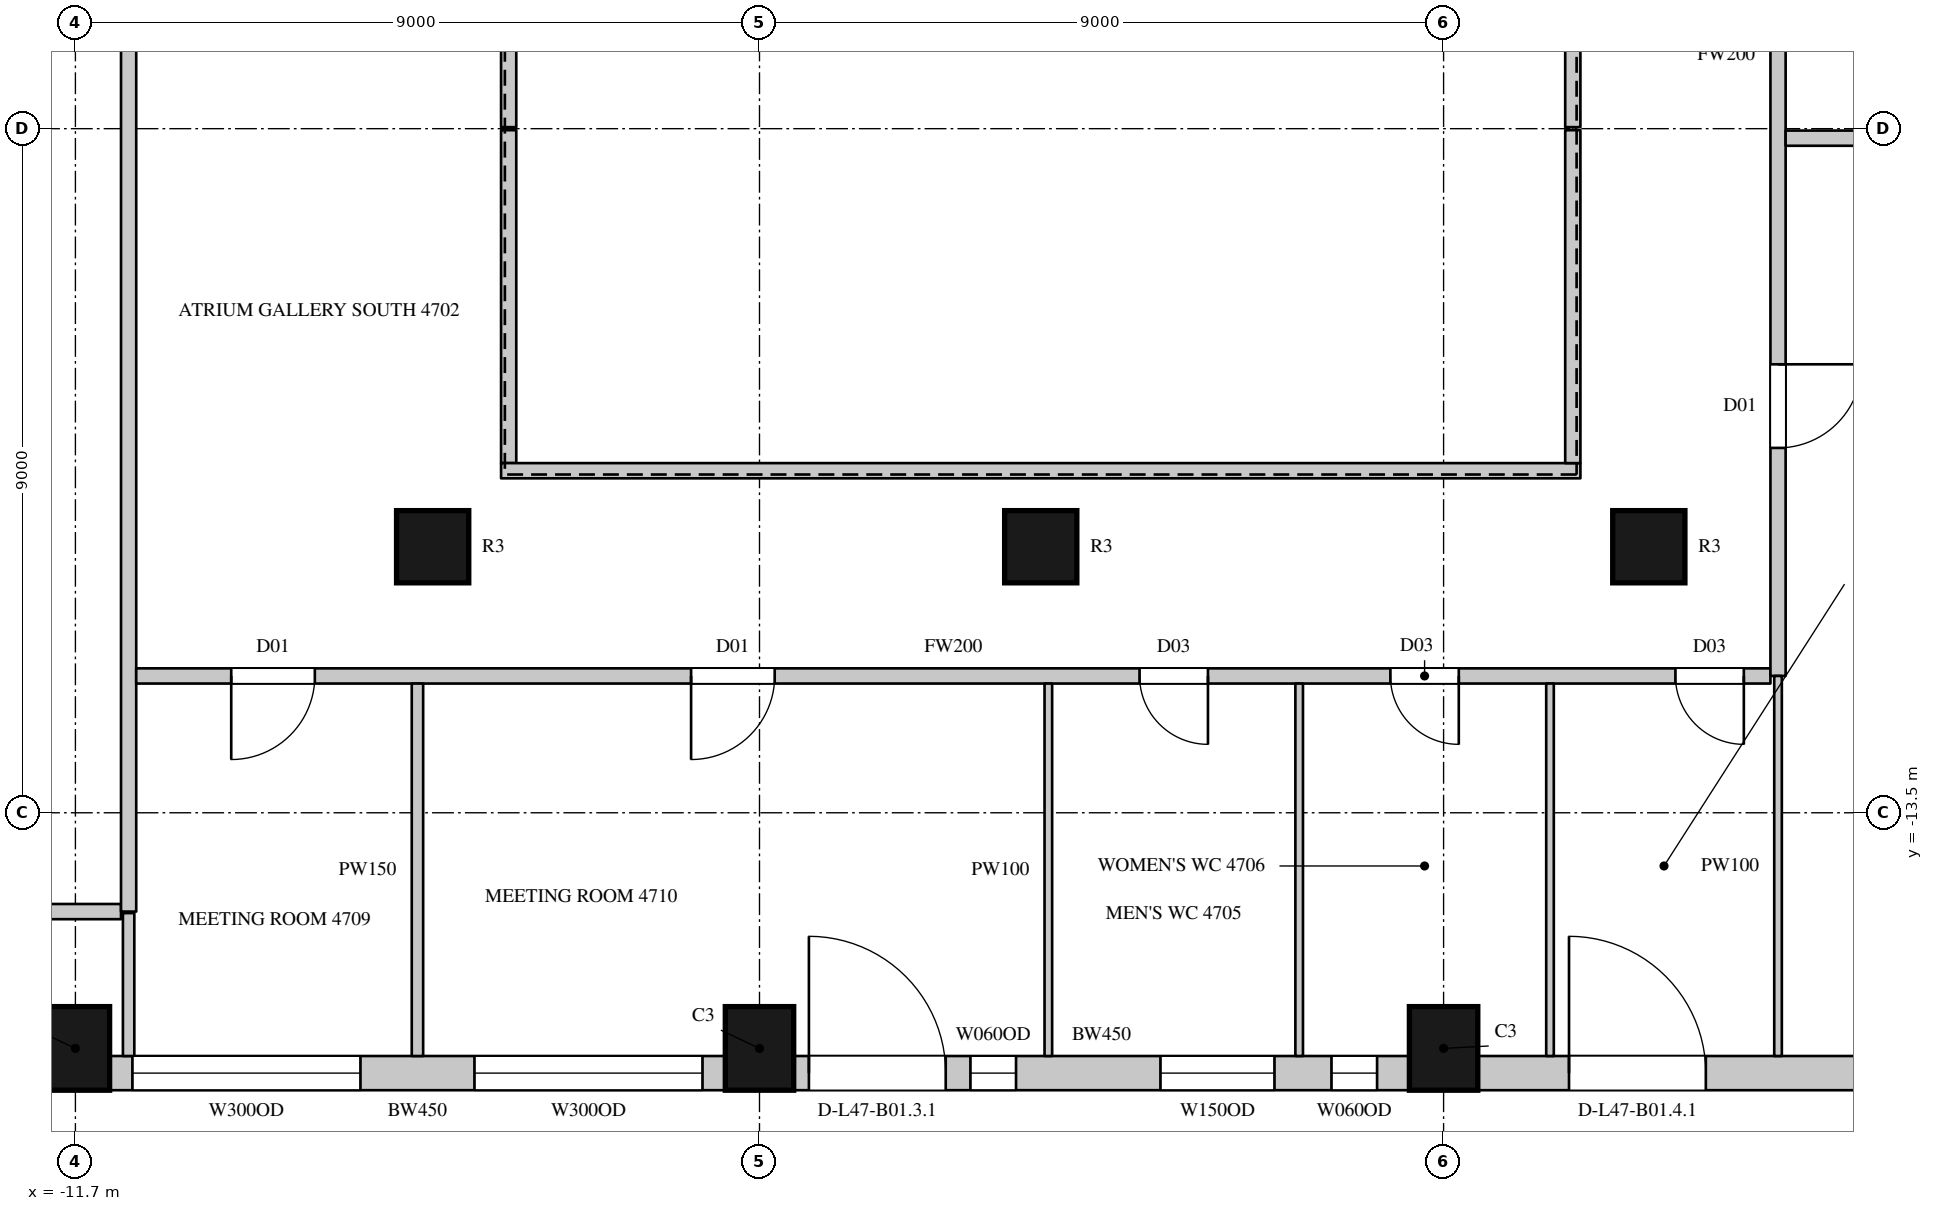
"""IFC4 building model, lengths in metres.
Left out: names, types, materials, properties, quantities, classifications, styles, units other than length and angle.
Written with IfcOpenShell. Run it as: python <this file> out.ifc"""

import sys

from ifc_helpers import new_model, si_unit, direction, frame, frame_2d, origin, origin_2d, place, context, subcontext, project, spatial, rectangle, circle, extrude, element, fill, save


model = new_model("IFC4")
c1 = context("Model", 3, precision=1e-05, world=origin(), true_north=direction((0.0, 1.0)))
c2 = subcontext(c1, "Body", "Model", "MODEL_VIEW")
j1 = project(units=[si_unit("LENGTHUNIT", "METRE"), si_unit("PLANEANGLEUNIT", "RADIAN")], contexts=[c1])
p1 = place(None, origin())
s1 = spatial("IfcSite", under=j1, at=p1, CompositionType="ELEMENT")
p2 = place(p1, origin())
s2 = spatial("IfcBuilding", under=s1, at=p2, CompositionType="ELEMENT")
p3 = place(p2, frame((0.0, 0.0, 213.8)))
s3 = spatial("IfcBuildingStorey", under=s2, at=p3, CompositionType="ELEMENT", Elevation=213.8)
for number, where, z_axis, x_axis in (
    (1, (-11.7, -16.6, 0.0), (0.0, 0.0, 1.0), (1.0, 0.0, 0.0)),
    (2, (-2.7, -16.6, 0.0), (0.0, 0.0, 1.0), (1.0, 0.0, 0.0)),
    (3, (6.3, -16.6, 0.0), (0.0, 0.0, 1.0), (1.0, 0.0, 0.0)),
):
    element("IfcColumn", number, at=place(p3, frame(where, z_axis=z_axis, x_axis=x_axis)), inside=s3, PredefinedType="COLUMN", context=c2, shape_type="SweptSolid", body=[
        extrude(rectangle(XDim=0.9, YDim=1.1, at=origin_2d()), origin(), (0.0, 0.0, 1.0), 4.1),
    ])
for number, where, z_axis, x_axis in (
    (4, (-7.0, -10.0, 0.0), (0.0, 0.0, 1.0), (1.0, 0.0, 0.0)),
    (5, (1.0, -10.0, 0.0), (0.0, 0.0, 1.0), (1.0, 0.0, 0.0)),
    (6, (9.0, -10.0, 0.0), (0.0, 0.0, 1.0), (1.0, 0.0, 0.0)),
):
    element("IfcColumn", number, at=place(p3, frame(where, z_axis=z_axis, x_axis=x_axis)), inside=s3, PredefinedType="COLUMN", context=c2, shape_type="SweptSolid", body=[
        extrude(circle(Radius=0.475, at=origin_2d()), origin(), (0.0, 0.0, 1.0), 4.1),
    ])
p4 = place(p3, frame((-11.25, -16.925, 0.0), z_axis=(0.0, 0.0, 1.0), x_axis=(1.0, 0.0, 0.0)))
e7 = element("IfcWall", 7, at=p4, inside=s3, PredefinedType="SOLIDWALL", context=c2, shape_type="SweptSolid", body=[
    extrude(rectangle(XDim=8.1, YDim=0.45, at=frame_2d((4.05, 0.0))), origin(), (0.0, 0.0, 1.0), 3.8),
])
p5 = place(p4, frame((0.3, 0.0, 1.05)))
e8 = element("IfcOpeningElement", 8, at=p5, cuts=e7, PredefinedType="OPENING", context=c2, shape_type="SweptSolid", body=[
    extrude(rectangle(XDim=3.0, YDim=2.4, at=frame_2d((1.5, 1.2))), frame((0.0, 0.235, 0.0), z_axis=(0.0, -1.0, 0.0), x_axis=(1.0, 0.0, 0.0)), (0.0, 0.0, 1.0), 0.47),
])
p6 = place(p4, frame((4.8, 0.0, 1.05)))
e9 = element("IfcOpeningElement", 9, at=p6, cuts=e7, PredefinedType="OPENING", context=c2, shape_type="SweptSolid", body=[
    extrude(rectangle(XDim=3.0, YDim=2.4, at=frame_2d((1.5, 1.2))), frame((0.0, 0.235, 0.0), z_axis=(0.0, -1.0, 0.0), x_axis=(1.0, 0.0, 0.0)), (0.0, 0.0, 1.0), 0.47),
])
p7 = place(p3, frame((-2.25, -16.925, 0.0), z_axis=(0.0, 0.0, 1.0), x_axis=(1.0, 0.0, 0.0)))
e10 = element("IfcWall", 10, at=p7, inside=s3, PredefinedType="SOLIDWALL", context=c2, shape_type="SweptSolid", body=[
    extrude(rectangle(XDim=8.1, YDim=0.45, at=frame_2d((4.05, 0.0))), origin(), (0.0, 0.0, 1.0), 3.8),
])
p8 = place(p7, frame((0.2, 0.0, 0.0)))
e11 = element("IfcOpeningElement", 11, at=p8, cuts=e10, PredefinedType="OPENING", context=c2, shape_type="SweptSolid", body=[
    extrude(rectangle(XDim=1.8, YDim=2.4, at=frame_2d((0.9, 1.2))), frame((0.0, 0.235, 0.0), z_axis=(0.0, -1.0, 0.0), x_axis=(1.0, 0.0, 0.0)), (0.0, 0.0, 1.0), 0.47),
])
p9 = place(p7, frame((2.325, 0.0, 1.05)))
e12 = element("IfcOpeningElement", 12, at=p9, cuts=e10, PredefinedType="OPENING", context=c2, shape_type="SweptSolid", body=[
    extrude(rectangle(XDim=0.6, YDim=2.4, at=frame_2d((0.3, 1.2))), frame((0.0, 0.235, 0.0), z_axis=(0.0, -1.0, 0.0), x_axis=(1.0, 0.0, 0.0)), (0.0, 0.0, 1.0), 0.47),
])
p10 = place(p7, frame((4.825, 0.0, 1.05)))
e13 = element("IfcOpeningElement", 13, at=p10, cuts=e10, PredefinedType="OPENING", context=c2, shape_type="SweptSolid", body=[
    extrude(rectangle(XDim=1.5, YDim=2.4, at=frame_2d((0.75, 1.2))), frame((0.0, 0.235, 0.0), z_axis=(0.0, -1.0, 0.0), x_axis=(1.0, 0.0, 0.0)), (0.0, 0.0, 1.0), 0.47),
])
p11 = place(p7, frame((7.075, 0.0, 1.05)))
e14 = element("IfcOpeningElement", 14, at=p11, cuts=e10, PredefinedType="OPENING", context=c2, shape_type="SweptSolid", body=[
    extrude(rectangle(XDim=0.6, YDim=2.4, at=frame_2d((0.3, 1.2))), frame((0.0, 0.235, 0.0), z_axis=(0.0, -1.0, 0.0), x_axis=(1.0, 0.0, 0.0)), (0.0, 0.0, 1.0), 0.47),
])
p12 = place(p3, frame((6.75, -16.925, 0.0), z_axis=(0.0, 0.0, 1.0), x_axis=(1.0, 0.0, 0.0)))
e15 = element("IfcWall", 15, at=p12, inside=s3, PredefinedType="SOLIDWALL", context=c2, shape_type="SweptSolid", body=[
    extrude(rectangle(XDim=6.414, YDim=0.45, at=frame_2d((3.207, 0.0))), origin(), (0.0, 0.0, 1.0), 3.8),
])
p13 = place(p12, frame((1.2, 0.0, 0.0)))
e16 = element("IfcOpeningElement", 16, at=p13, cuts=e15, PredefinedType="OPENING", context=c2, shape_type="SweptSolid", body=[
    extrude(rectangle(XDim=1.8, YDim=2.4, at=frame_2d((0.9, 1.2))), frame((0.0, 0.235, 0.0), z_axis=(0.0, -1.0, 0.0), x_axis=(1.0, 0.0, 0.0)), (0.0, 0.0, 1.0), 0.47),
])
p14 = place(p3, frame((-13.97, -14.8, 0.0), z_axis=(0.0, 0.0, 1.0), x_axis=(1.0, 0.0, 0.0)))
e17 = element("IfcWall", 17, at=p14, inside=s3, PredefinedType="PARTITIONING", context=c2, shape_type="SweptSolid", body=[
    extrude(rectangle(XDim=2.87, YDim=0.2, at=frame_2d((1.435, 0.0))), origin(), (0.0, 0.0, 1.0), 3.8),
])
p15 = place(p3, frame((-11.0, -14.8, 0.0), z_axis=(0.0, 0.0, 1.0), x_axis=(0.0, 1.0, 0.0)))
e18 = element("IfcWall", 18, at=p15, inside=s3, PredefinedType="PARTITIONING", context=c2, shape_type="SweptSolid", body=[
    extrude(rectangle(XDim=29.6, YDim=0.2, at=frame_2d((14.8, 0.0))), origin(), (0.0, 0.0, 1.0), 3.8),
])
p16 = place(p15, frame((17.9, 0.0, 0.0)))
e19 = element("IfcOpeningElement", 19, at=p16, cuts=e18, PredefinedType="OPENING", context=c2, shape_type="SweptSolid", body=[
    extrude(rectangle(XDim=1.5, YDim=2.4, at=frame_2d((0.75, 1.2))), frame((0.0, 0.11, 0.0), z_axis=(0.0, -1.0, 0.0), x_axis=(1.0, 0.0, 0.0)), (0.0, 0.0, 1.0), 0.22),
])
p17 = place(p3, frame((-10.9, -11.7, 0.0), z_axis=(0.0, 0.0, 1.0), x_axis=(1.0, 0.0, 0.0)))
e20 = element("IfcWall", 20, at=p17, inside=s3, PredefinedType="PARTITIONING", context=c2, shape_type="SweptSolid", body=[
    extrude(rectangle(XDim=21.5, YDim=0.2, at=frame_2d((10.75, 0.0))), origin(), (0.0, 0.0, 1.0), 3.8),
])
p18 = place(p17, frame((13.2, 0.0, 0.0)))
e21 = element("IfcOpeningElement", 21, at=p18, cuts=e20, PredefinedType="OPENING", context=c2, shape_type="SweptSolid", body=[
    extrude(rectangle(XDim=0.9, YDim=2.2, at=frame_2d((0.45, 1.1))), frame((0.0, 0.11, 0.0), z_axis=(0.0, -1.0, 0.0), x_axis=(1.0, 0.0, 0.0)), (0.0, 0.0, 1.0), 0.22),
])
p19 = place(p17, frame((16.5, 0.0, 0.0)))
e22 = element("IfcOpeningElement", 22, at=p19, cuts=e20, PredefinedType="OPENING", context=c2, shape_type="SweptSolid", body=[
    extrude(rectangle(XDim=0.9, YDim=2.2, at=frame_2d((0.45, 1.1))), frame((0.0, 0.11, 0.0), z_axis=(0.0, -1.0, 0.0), x_axis=(1.0, 0.0, 0.0)), (0.0, 0.0, 1.0), 0.22),
])
p20 = place(p17, frame((20.25, 0.0, 0.0)))
e23 = element("IfcOpeningElement", 23, at=p20, cuts=e20, PredefinedType="OPENING", context=c2, shape_type="SweptSolid", body=[
    extrude(rectangle(XDim=0.9, YDim=2.2, at=frame_2d((0.45, 1.1))), frame((0.0, 0.11, 0.0), z_axis=(0.0, -1.0, 0.0), x_axis=(1.0, 0.0, 0.0)), (0.0, 0.0, 1.0), 0.22),
])
p21 = place(p17, frame((1.25, 0.0, 0.0)))
e24 = element("IfcOpeningElement", 24, at=p21, cuts=e20, PredefinedType="OPENING", context=c2, shape_type="SweptSolid", body=[
    extrude(rectangle(XDim=1.1, YDim=2.4, at=frame_2d((0.55, 1.2))), frame((0.0, 0.11, 0.0), z_axis=(0.0, -1.0, 0.0), x_axis=(1.0, 0.0, 0.0)), (0.0, 0.0, 1.0), 0.22),
])
p22 = place(p17, frame((7.3, 0.0, 0.0)))
e25 = element("IfcOpeningElement", 25, at=p22, cuts=e20, PredefinedType="OPENING", context=c2, shape_type="SweptSolid", body=[
    extrude(rectangle(XDim=1.1, YDim=2.4, at=frame_2d((0.55, 1.2))), frame((0.0, 0.11, 0.0), z_axis=(0.0, -1.0, 0.0), x_axis=(1.0, 0.0, 0.0)), (0.0, 0.0, 1.0), 0.22),
])
p23 = place(p3, frame((-6.0, -8.9, 0.0), z_axis=(0.0, 0.0, 1.0), x_axis=(0.0, 1.0, 0.0)))
e26 = element("IfcWall", 26, at=p23, inside=s3, PredefinedType="PARTITIONING", context=c2, shape_type="SweptSolid", body=[
    extrude(rectangle(XDim=4.38, YDim=0.2, at=frame_2d((2.19, 0.0))), origin(), (0.0, 0.0, 1.0), 3.8),
])
p24 = place(p3, frame((-6.1, -9.0, 0.0), z_axis=(0.0, 0.0, 1.0), x_axis=(1.0, 0.0, 0.0)))
e27 = element("IfcWall", 27, at=p24, inside=s3, PredefinedType="PARTITIONING", context=c2, shape_type="SweptSolid", body=[
    extrude(rectangle(XDim=14.2, YDim=0.2, at=frame_2d((7.1, 0.0))), origin(), (0.0, 0.0, 1.0), 3.8),
])
p25 = place(p3, frame((-6.0, -4.48, 0.0), z_axis=(0.0, 0.0, 1.0), x_axis=(0.0, 1.0, 0.0)))
e28 = element("IfcWall", 28, at=p25, inside=s3, PredefinedType="PARTITIONING", context=c2, shape_type="SweptSolid", body=[
    extrude(rectangle(XDim=13.38, YDim=0.2, at=frame_2d((6.69, 0.0))), origin(), (0.0, 0.0, 1.0), 3.8),
])
p26 = place(p3, frame((8.0, -8.9, 0.0), z_axis=(0.0, 0.0, 1.0), x_axis=(0.0, 1.0, 0.0)))
e29 = element("IfcWall", 29, at=p26, inside=s3, PredefinedType="PARTITIONING", context=c2, shape_type="SweptSolid", body=[
    extrude(rectangle(XDim=4.38, YDim=0.2, at=frame_2d((2.19, 0.0))), origin(), (0.0, 0.0, 1.0), 3.8),
])
p27 = place(p3, frame((8.0, -4.48, 0.0), z_axis=(0.0, 0.0, 1.0), x_axis=(0.0, 1.0, 0.0)))
e30 = element("IfcWall", 30, at=p27, inside=s3, PredefinedType="PARTITIONING", context=c2, shape_type="SweptSolid", body=[
    extrude(rectangle(XDim=13.38, YDim=0.2, at=frame_2d((6.69, 0.0))), origin(), (0.0, 0.0, 1.0), 3.8),
])
p28 = place(p3, frame((10.7, -11.7, 0.0), z_axis=(0.0, 0.0, 1.0), x_axis=(0.0, 1.0, 0.0)))
e31 = element("IfcWall", 31, at=p28, inside=s3, PredefinedType="PARTITIONING", context=c2, shape_type="SweptSolid", body=[
    extrude(rectangle(XDim=16.345, YDim=0.2, at=frame_2d((8.172, 0.0))), origin(), (0.0, 0.0, 1.0), 3.8),
])
p29 = place(p28, frame((12.35, 0.0, 0.0)))
e32 = element("IfcOpeningElement", 32, at=p29, cuts=e31, PredefinedType="OPENING", context=c2, shape_type="SweptSolid", body=[
    extrude(rectangle(XDim=1.5, YDim=2.4, at=frame_2d((0.75, 1.2))), frame((0.0, 0.11, 0.0), z_axis=(0.0, -1.0, 0.0), x_axis=(1.0, 0.0, 0.0)), (0.0, 0.0, 1.0), 0.22),
])
p30 = place(p28, frame((3.0, 0.0, 0.0)))
e33 = element("IfcOpeningElement", 33, at=p30, cuts=e31, PredefinedType="OPENING", context=c2, shape_type="SweptSolid", body=[
    extrude(rectangle(XDim=1.1, YDim=2.4, at=frame_2d((0.55, 1.2))), frame((0.0, 0.11, 0.0), z_axis=(0.0, -1.0, 0.0), x_axis=(1.0, 0.0, 0.0)), (0.0, 0.0, 1.0), 0.22),
])
p31 = place(p3, frame((10.8, -4.625, 0.0), z_axis=(0.0, 0.0, 1.0), x_axis=(1.0, 0.0, 0.0)))
e34 = element("IfcWall", 34, at=p31, inside=s3, PredefinedType="PARTITIONING", context=c2, shape_type="SweptSolid", body=[
    extrude(rectangle(XDim=3.875, YDim=0.2, at=frame_2d((1.938, 0.0))), origin(), (0.0, 0.0, 1.0), 3.8),
])
p32 = place(p3, frame((-11.0, -16.7, 0.0), z_axis=(0.0, 0.0, 1.0), x_axis=(0.0, 1.0, 0.0)))
e35 = element("IfcWall", 35, at=p32, inside=s3, PredefinedType="PARTITIONING", context=c2, shape_type="SweptSolid", body=[
    extrude(rectangle(XDim=1.88, YDim=0.15, at=frame_2d((0.94, 0.0))), origin(), (0.0, 0.0, 1.0), 3.8),
])
p33 = place(p3, frame((-7.2, -16.7, 0.0), z_axis=(0.0, 0.0, 1.0), x_axis=(0.0, 1.0, 0.0)))
e36 = element("IfcWall", 36, at=p33, inside=s3, PredefinedType="PARTITIONING", context=c2, shape_type="SweptSolid", body=[
    extrude(rectangle(XDim=4.9, YDim=0.15, at=frame_2d((2.45, 0.0))), origin(), (0.0, 0.0, 1.0), 3.15),
])
for number, where, z_axis, x_axis in (
    (37, (1.1, -16.7, 0.0), (0.0, 0.0, 1.0), (0.0, 1.0, 0.0)),
    (38, (4.4, -16.7, 0.0), (0.0, 0.0, 1.0), (0.0, 1.0, 0.0)),
    (39, (7.7, -16.7, 0.0), (0.0, 0.0, 1.0), (0.0, 1.0, 0.0)),
):
    element("IfcWall", number, at=place(p3, frame(where, z_axis=z_axis, x_axis=x_axis)), inside=s3, PredefinedType="PARTITIONING", context=c2, shape_type="SweptSolid", body=[
        extrude(rectangle(XDim=4.9, YDim=0.1, at=frame_2d((2.45, 0.0))), origin(), (0.0, 0.0, 1.0), 3.8),
    ])
p34 = place(p3, frame((10.7, -16.7, 0.0), z_axis=(0.0, 0.0, 1.0), x_axis=(0.0, 1.0, 0.0)))
e40 = element("IfcWall", 40, at=p34, inside=s3, PredefinedType="PARTITIONING", context=c2, shape_type="SweptSolid", body=[
    extrude(rectangle(XDim=5.0, YDim=0.1, at=frame_2d((2.5, 0.0))), origin(), (0.0, 0.0, 1.0), 3.8),
])
p35 = place(p5, origin())
e41 = element("IfcWindow", 41, at=p35, inside=s3, PartitioningType="SINGLE_PANEL", PredefinedType="WINDOW", context=c2, shape_type="SweptSolid", body=[
    extrude(rectangle(XDim=3.0, YDim=2.4, at=frame_2d((1.5, 1.2))), frame((0.0, 0.135, 0.0), z_axis=(0.0, -1.0, 0.0), x_axis=(1.0, 0.0, 0.0)), (0.0, 0.0, 1.0), 0.06),
])
fill(e8, e41)
p36 = place(p6, origin())
e42 = element("IfcWindow", 42, at=p36, inside=s3, PartitioningType="SINGLE_PANEL", PredefinedType="WINDOW", context=c2, shape_type="SweptSolid", body=[
    extrude(rectangle(XDim=3.0, YDim=2.4, at=frame_2d((1.5, 1.2))), frame((0.0, 0.135, 0.0), z_axis=(0.0, -1.0, 0.0), x_axis=(1.0, 0.0, 0.0)), (0.0, 0.0, 1.0), 0.06),
])
fill(e9, e42)
p37 = place(p8, origin())
e43 = element("IfcDoor", 43, at=p37, inside=s3, OperationType="SLIDING_TO_LEFT", PredefinedType="DOOR", context=c2, shape_type="SweptSolid", body=[
    extrude(rectangle(XDim=1.8, YDim=2.4, at=frame_2d((0.9, 1.2))), frame((0.0, 0.13, 0.0), z_axis=(0.0, -1.0, 0.0), x_axis=(1.0, 0.0, 0.0)), (0.0, 0.0, 1.0), 0.05),
])
fill(e11, e43)
p38 = place(p13, origin())
e44 = element("IfcDoor", 44, at=p38, inside=s3, OperationType="SLIDING_TO_LEFT", PredefinedType="DOOR", context=c2, shape_type="SweptSolid", body=[
    extrude(rectangle(XDim=1.8, YDim=2.4, at=frame_2d((0.9, 1.2))), frame((0.0, 0.13, 0.0), z_axis=(0.0, -1.0, 0.0), x_axis=(1.0, 0.0, 0.0)), (0.0, 0.0, 1.0), 0.05),
])
fill(e16, e44)
p39 = place(p18, origin())
e45 = element("IfcDoor", 45, at=p39, inside=s3, OperationType="SINGLE_SWING_LEFT", PredefinedType="DOOR", context=c2, shape_type="SweptSolid", body=[
    extrude(rectangle(XDim=0.9, YDim=2.2, at=frame_2d((0.45, 1.1))), frame((0.0, 0.025, 0.0), z_axis=(0.0, -1.0, 0.0), x_axis=(1.0, 0.0, 0.0)), (0.0, 0.0, 1.0), 0.05),
])
fill(e21, e45)
p40 = place(p19, origin())
e46 = element("IfcDoor", 46, at=p40, inside=s3, OperationType="SINGLE_SWING_LEFT", PredefinedType="DOOR", context=c2, shape_type="SweptSolid", body=[
    extrude(rectangle(XDim=0.9, YDim=2.2, at=frame_2d((0.45, 1.1))), frame((0.0, 0.025, 0.0), z_axis=(0.0, -1.0, 0.0), x_axis=(1.0, 0.0, 0.0)), (0.0, 0.0, 1.0), 0.05),
])
fill(e22, e46)
p41 = place(p20, origin())
e47 = element("IfcDoor", 47, at=p41, inside=s3, OperationType="SINGLE_SWING_LEFT", PredefinedType="DOOR", context=c2, shape_type="SweptSolid", body=[
    extrude(rectangle(XDim=0.9, YDim=2.2, at=frame_2d((0.45, 1.1))), frame((0.0, 0.025, 0.0), z_axis=(0.0, -1.0, 0.0), x_axis=(1.0, 0.0, 0.0)), (0.0, 0.0, 1.0), 0.05),
])
fill(e23, e47)
p42 = place(p21, origin())
e48 = element("IfcDoor", 48, at=p42, inside=s3, OperationType="SINGLE_SWING_RIGHT", PredefinedType="DOOR", context=c2, shape_type="SweptSolid", body=[
    extrude(rectangle(XDim=1.1, YDim=2.4, at=frame_2d((0.55, 1.2))), frame((0.0, 0.025, 0.0), z_axis=(0.0, -1.0, 0.0), x_axis=(1.0, 0.0, 0.0)), (0.0, 0.0, 1.0), 0.05),
])
fill(e24, e48)
p43 = place(p22, origin())
e49 = element("IfcDoor", 49, at=p43, inside=s3, OperationType="SINGLE_SWING_RIGHT", PredefinedType="DOOR", context=c2, shape_type="SweptSolid", body=[
    extrude(rectangle(XDim=1.1, YDim=2.4, at=frame_2d((0.55, 1.2))), frame((0.0, 0.025, 0.0), z_axis=(0.0, -1.0, 0.0), x_axis=(1.0, 0.0, 0.0)), (0.0, 0.0, 1.0), 0.05),
])
fill(e25, e49)
p44 = place(p30, origin())
e50 = element("IfcDoor", 50, at=p44, inside=s3, OperationType="SINGLE_SWING_LEFT", PredefinedType="DOOR", context=c2, shape_type="SweptSolid", body=[
    extrude(rectangle(XDim=1.1, YDim=2.4, at=frame_2d((0.55, 1.2))), frame((0.0, 0.025, 0.0), z_axis=(0.0, -1.0, 0.0), x_axis=(1.0, 0.0, 0.0)), (0.0, 0.0, 1.0), 0.05),
])
fill(e33, e50)
p45 = place(p9, origin())
e51 = element("IfcWindow", 51, at=p45, inside=s3, PartitioningType="SINGLE_PANEL", PredefinedType="WINDOW", context=c2, shape_type="SweptSolid", body=[
    extrude(rectangle(XDim=0.6, YDim=2.4, at=frame_2d((0.3, 1.2))), frame((0.0, 0.135, 0.0), z_axis=(0.0, -1.0, 0.0), x_axis=(1.0, 0.0, 0.0)), (0.0, 0.0, 1.0), 0.06),
])
fill(e12, e51)
p46 = place(p10, origin())
e52 = element("IfcWindow", 52, at=p46, inside=s3, PartitioningType="SINGLE_PANEL", PredefinedType="WINDOW", context=c2, shape_type="SweptSolid", body=[
    extrude(rectangle(XDim=1.5, YDim=2.4, at=frame_2d((0.75, 1.2))), frame((0.0, 0.135, 0.0), z_axis=(0.0, -1.0, 0.0), x_axis=(1.0, 0.0, 0.0)), (0.0, 0.0, 1.0), 0.06),
])
fill(e13, e52)
p47 = place(p11, origin())
e53 = element("IfcWindow", 53, at=p47, inside=s3, PartitioningType="SINGLE_PANEL", PredefinedType="WINDOW", context=c2, shape_type="SweptSolid", body=[
    extrude(rectangle(XDim=0.6, YDim=2.4, at=frame_2d((0.3, 1.2))), frame((0.0, 0.135, 0.0), z_axis=(0.0, -1.0, 0.0), x_axis=(1.0, 0.0, 0.0)), (0.0, 0.0, 1.0), 0.06),
])
fill(e14, e53)
save(model, sys.argv[1])
